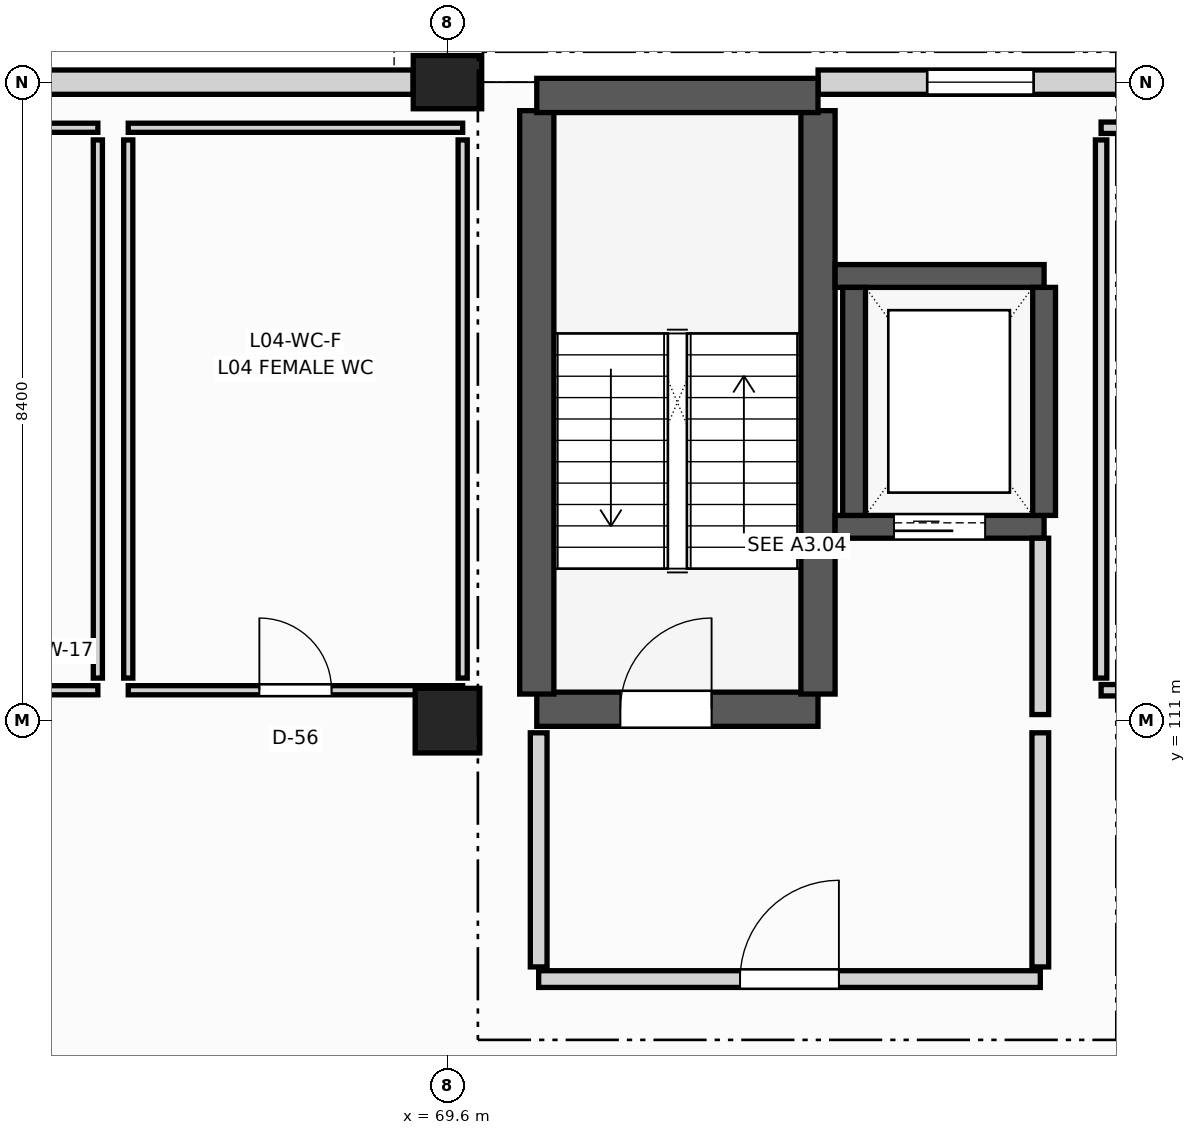
"""IFC4 building model, lengths in metres.
Left out: names, types, materials, properties, quantities, classifications, styles, units other than length and angle.
Written with IfcOpenShell. Run it as: python <this file> out.ifc"""

import sys

from ifc_helpers import new_model, si_unit, direction, frame, frame_2d, origin, origin_2d, place, context, subcontext, project, spatial, rectangle, extrude, element, fill, save


model = new_model("IFC4")
c1 = context("Model", 3, precision=1e-05, world=origin(), true_north=direction((0.0, 1.0)))
c2 = subcontext(c1, "Body", "Model", "MODEL_VIEW")
j1 = project(units=[si_unit("LENGTHUNIT", "METRE"), si_unit("PLANEANGLEUNIT", "RADIAN")], contexts=[c1])
p1 = place(None, origin())
s1 = spatial("IfcSite", under=j1, at=p1, CompositionType="ELEMENT")
p2 = place(p1, origin())
s2 = spatial("IfcBuilding", under=s1, at=p2, CompositionType="ELEMENT")
p3 = place(p2, frame((0.0, 0.0, 18.3)))
s3 = spatial("IfcBuildingStorey", under=s2, at=p3, CompositionType="ELEMENT", Elevation=18.3)
p4 = place(p3, frame((69.6, 111.0, 0.0), z_axis=(0.0, 0.0, 1.0), x_axis=(1.0, 0.0, 0.0)))
e1 = element("IfcColumn", 1, at=p4, inside=s3, PredefinedType="COLUMN", context=c2, shape_type="SweptSolid", body=[
    extrude(rectangle(XDim=0.85, YDim=0.85, at=origin_2d()), origin(), (0.0, 0.0, 1.0), 3.9),
])
p5 = place(p3, frame((69.6, 119.4, 0.0), z_axis=(0.0, 0.0, 1.0), x_axis=(1.0, 0.0, 0.0)))
e2 = element("IfcColumn", 2, at=p5, inside=s3, PredefinedType="COLUMN", context=c2, shape_type="SweptSolid", body=[
    extrude(rectangle(XDim=0.9, YDim=0.7, at=origin_2d()), origin(), (0.0, 0.0, 1.0), 3.9),
])
p6 = place(p3, frame((60.452, 119.4, 0.0), z_axis=(0.0, 0.0, 1.0), x_axis=(1.0, 0.0, 0.0)))
e3 = element("IfcWall", 3, at=p6, inside=s3, PredefinedType="SOLIDWALL", context=c2, shape_type="SweptSolid", body=[
    extrude(rectangle(XDim=8.696, YDim=0.32, at=frame_2d((4.348, 0.0))), origin(), (0.0, 0.0, 1.0), 3.08),
])
p7 = place(p6, frame((0.848, 0.0, 1.45)))
e4 = element("IfcOpeningElement", 4, at=p7, cuts=e3, PredefinedType="OPENING", context=c2, shape_type="SweptSolid", body=[
    extrude(rectangle(XDim=3.0, YDim=1.35, at=frame_2d((1.5, 0.675))), frame((0.0, 0.17, 0.0), z_axis=(0.0, -1.0, 0.0), x_axis=(1.0, 0.0, 0.0)), (0.0, 0.0, 1.0), 0.34),
])
p8 = place(p3, frame((74.476, 119.4, 0.0), z_axis=(0.0, 0.0, 1.0), x_axis=(1.0, 0.0, 0.0)))
e5 = element("IfcWall", 5, at=p8, inside=s3, PredefinedType="SOLIDWALL", context=c2, shape_type="SweptSolid", body=[
    extrude(rectangle(XDim=4.272, YDim=0.32, at=frame_2d((2.136, 0.0))), origin(), (0.0, 0.0, 1.0), 3.08),
])
p9 = place(p8, frame((1.436, 0.0, 0.9)))
e6 = element("IfcOpeningElement", 6, at=p9, cuts=e5, PredefinedType="OPENING", context=c2, shape_type="SweptSolid", body=[
    extrude(rectangle(XDim=1.4, YDim=1.65, at=frame_2d((0.7, 0.825))), frame((0.0, 0.17, 0.0), z_axis=(0.0, -1.0, 0.0), x_axis=(1.0, 0.0, 0.0)), (0.0, 0.0, 1.0), 0.34),
])
p10 = place(p3, frame((70.775, 111.15, 0.0), z_axis=(0.0, 0.0, 1.0), x_axis=(1.0, 0.0, 0.0)))
e7 = element("IfcWall", 7, at=p10, inside=s3, PredefinedType="SHEAR", context=c2, shape_type="SweptSolid", body=[
    extrude(rectangle(XDim=3.7, YDim=0.45, at=frame_2d((1.85, 0.0))), origin(), (0.0, 0.0, 1.0), 3.9),
])
p11 = place(p10, frame((1.1, 0.0, 0.0)))
e8 = element("IfcOpeningElement", 8, at=p11, cuts=e7, PredefinedType="OPENING", context=c2, shape_type="SweptSolid", body=[
    extrude(rectangle(XDim=1.2, YDim=2.2, at=frame_2d((0.6, 1.1))), frame((0.0, 0.235, 0.0), z_axis=(0.0, -1.0, 0.0), x_axis=(1.0, 0.0, 0.0)), (0.0, 0.0, 1.0), 0.47),
])
for number, where, z_axis, x_axis in (
    (9, (70.775, 111.35, 0.0), (0.0, 0.0, 1.0), (0.0, 1.0, 0.0)),
    (10, (74.475, 111.35, 0.0), (0.0, 0.0, 1.0), (0.0, 1.0, 0.0)),
):
    element("IfcWall", number, at=place(p3, frame(where, z_axis=z_axis, x_axis=x_axis)), inside=s3, PredefinedType="SHEAR", context=c2, shape_type="SweptSolid", body=[
        extrude(rectangle(XDim=7.675, YDim=0.45, at=frame_2d((3.837, 0.0))), origin(), (0.0, 0.0, 1.0), 3.9),
    ])
p12 = place(p3, frame((70.775, 119.225, 0.0), z_axis=(0.0, 0.0, 1.0), x_axis=(1.0, 0.0, 0.0)))
e11 = element("IfcWall", 11, at=p12, inside=s3, PredefinedType="SHEAR", context=c2, shape_type="SweptSolid", body=[
    extrude(rectangle(XDim=3.7, YDim=0.45, at=frame_2d((1.85, 0.0))), origin(), (0.0, 0.0, 1.0), 3.9),
])
p13 = place(p3, frame((74.7, 113.55, 0.0), z_axis=(0.0, 0.0, 1.0), x_axis=(1.0, 0.0, 0.0)))
e12 = element("IfcWall", 12, at=p13, inside=s3, PredefinedType="SHEAR", context=c2, shape_type="SweptSolid", body=[
    extrude(rectangle(XDim=2.75, YDim=0.3, at=frame_2d((1.375, 0.0))), origin(), (0.0, 0.0, 1.0), 3.9),
])
p14 = place(p13, frame((0.775, 0.0, 0.0)))
e13 = element("IfcOpeningElement", 13, at=p14, cuts=e12, PredefinedType="OPENING", context=c2, shape_type="SweptSolid", body=[
    extrude(rectangle(XDim=1.2, YDim=2.2, at=frame_2d((0.6, 1.1))), frame((0.0, 0.16, 0.0), z_axis=(0.0, -1.0, 0.0), x_axis=(1.0, 0.0, 0.0)), (0.0, 0.0, 1.0), 0.32),
])
p15 = place(p3, frame((74.7, 116.85, 0.0), z_axis=(0.0, 0.0, 1.0), x_axis=(1.0, 0.0, 0.0)))
e14 = element("IfcWall", 14, at=p15, inside=s3, PredefinedType="SHEAR", context=c2, shape_type="SweptSolid", body=[
    extrude(rectangle(XDim=2.75, YDim=0.3, at=frame_2d((1.375, 0.0))), origin(), (0.0, 0.0, 1.0), 3.9),
])
for number, where, z_axis, x_axis in (
    (15, (74.95, 113.7, 0.0), (0.0, 0.0, 1.0), (0.0, 1.0, 0.0)),
    (16, (77.45, 113.7, 0.0), (0.0, 0.0, 1.0), (0.0, 1.0, 0.0)),
):
    element("IfcWall", number, at=place(p3, frame(where, z_axis=z_axis, x_axis=x_axis)), inside=s3, PredefinedType="SHEAR", context=c2, shape_type="SweptSolid", body=[
        extrude(rectangle(XDim=3.0, YDim=0.3, at=frame_2d((1.5, 0.0))), origin(), (0.0, 0.0, 1.0), 3.9),
    ])
p16 = place(p3, frame((70.8, 107.6, 0.0), z_axis=(0.0, 0.0, 1.0), x_axis=(1.0, 0.0, 0.0)))
e17 = element("IfcWall", 17, at=p16, inside=s3, PredefinedType="PARTITIONING", context=c2, shape_type="SweptSolid", body=[
    extrude(rectangle(XDim=6.6, YDim=0.22, at=frame_2d((3.3, 0.0))), origin(), (0.0, 0.0, 1.0), 3.15),
])
p17 = place(p16, frame((2.65, 0.0, 0.0)))
e18 = element("IfcOpeningElement", 18, at=p17, cuts=e17, PredefinedType="OPENING", context=c2, shape_type="SweptSolid", body=[
    extrude(rectangle(XDim=1.3, YDim=2.2, at=frame_2d((0.65, 1.1))), frame((0.0, 0.12, 0.0), z_axis=(0.0, -1.0, 0.0), x_axis=(1.0, 0.0, 0.0)), (0.0, 0.0, 1.0), 0.24),
])
p18 = place(p3, frame((77.4, 111.08, 0.0), z_axis=(0.0, 0.0, 1.0), x_axis=(0.0, 1.0, 0.0)))
e19 = element("IfcWall", 19, at=p18, inside=s3, PredefinedType="PARTITIONING", context=c2, shape_type="SweptSolid", body=[
    extrude(rectangle(XDim=2.32, YDim=0.22, at=frame_2d((1.16, 0.0))), origin(), (0.0, 0.0, 1.0), 3.15),
])
for number, where, z_axis, x_axis in (
    (20, (70.8, 107.76, 0.0), (0.0, 0.0, 1.0), (0.0, 1.0, 0.0)),
    (21, (77.4, 107.76, 0.0), (0.0, 0.0, 1.0), (0.0, 1.0, 0.0)),
):
    element("IfcWall", number, at=place(p3, frame(where, z_axis=z_axis, x_axis=x_axis)), inside=s3, PredefinedType="PARTITIONING", context=c2, shape_type="SweptSolid", body=[
        extrude(rectangle(XDim=3.08, YDim=0.22, at=frame_2d((1.54, 0.0))), origin(), (0.0, 0.0, 1.0), 3.15),
    ])
p19 = place(p3, frame((78.2, 111.4, 0.0), z_axis=(0.0, 0.0, 1.0), x_axis=(1.0, 0.0, 0.0)))
e22 = element("IfcWall", 22, at=p19, inside=s3, PredefinedType="PARTITIONING", context=c2, shape_type="SweptSolid", body=[
    extrude(rectangle(XDim=21.4, YDim=0.15, at=frame_2d((10.7, 0.0))), origin(), (0.0, 0.0, 1.0), 3.15),
])
p20 = place(p19, frame((6.94, 0.0, 0.0)))
e23 = element("IfcOpeningElement", 23, at=p20, cuts=e22, PredefinedType="OPENING", context=c2, shape_type="SweptSolid", body=[
    extrude(rectangle(XDim=1.1, YDim=2.2, at=frame_2d((0.55, 1.1))), frame((0.0, 0.085, 0.0), z_axis=(0.0, -1.0, 0.0), x_axis=(1.0, 0.0, 0.0)), (0.0, 0.0, 1.0), 0.17),
])
p21 = place(p3, frame((78.2, 118.8, 0.0), z_axis=(0.0, 0.0, 1.0), x_axis=(1.0, 0.0, 0.0)))
e24 = element("IfcWall", 24, at=p21, inside=s3, PredefinedType="PARTITIONING", context=c2, shape_type="SweptSolid", body=[
    extrude(rectangle(XDim=21.4, YDim=0.15, at=frame_2d((10.7, 0.0))), origin(), (0.0, 0.0, 1.0), 3.15),
])
p22 = place(p3, frame((78.2, 111.56, 0.0), z_axis=(0.0, 0.0, 1.0), x_axis=(0.0, 1.0, 0.0)))
e25 = element("IfcWall", 25, at=p22, inside=s3, PredefinedType="PARTITIONING", context=c2, shape_type="SweptSolid", body=[
    extrude(rectangle(XDim=7.08, YDim=0.15, at=frame_2d((3.54, 0.0))), origin(), (0.0, 0.0, 1.0), 3.15),
])
p23 = place(p3, frame((60.8, 111.4, 0.0), z_axis=(0.0, 0.0, 1.0), x_axis=(1.0, 0.0, 0.0)))
e26 = element("IfcWall", 26, at=p23, inside=s3, PredefinedType="PARTITIONING", context=c2, shape_type="SweptSolid", body=[
    extrude(rectangle(XDim=4.2, YDim=0.12, at=frame_2d((2.1, 0.0))), origin(), (0.0, 0.0, 1.0), 3.15),
])
p24 = place(p23, frame((1.625, 0.0, 0.0)))
e27 = element("IfcOpeningElement", 27, at=p24, cuts=e26, PredefinedType="OPENING", context=c2, shape_type="SweptSolid", body=[
    extrude(rectangle(XDim=0.95, YDim=2.1, at=frame_2d((0.475, 1.05))), frame((0.0, 0.07, 0.0), z_axis=(0.0, -1.0, 0.0), x_axis=(1.0, 0.0, 0.0)), (0.0, 0.0, 1.0), 0.14),
])
p25 = place(p3, frame((60.8, 118.8, 0.0), z_axis=(0.0, 0.0, 1.0), x_axis=(1.0, 0.0, 0.0)))
e28 = element("IfcWall", 28, at=p25, inside=s3, PredefinedType="PARTITIONING", context=c2, shape_type="SweptSolid", body=[
    extrude(rectangle(XDim=4.2, YDim=0.12, at=frame_2d((2.1, 0.0))), origin(), (0.0, 0.0, 1.0), 3.15),
])
p26 = place(p3, frame((65.0, 111.56, 0.0), z_axis=(0.0, 0.0, 1.0), x_axis=(0.0, 1.0, 0.0)))
e29 = element("IfcWall", 29, at=p26, inside=s3, PredefinedType="PARTITIONING", context=c2, shape_type="SweptSolid", body=[
    extrude(rectangle(XDim=7.08, YDim=0.12, at=frame_2d((3.54, 0.0))), origin(), (0.0, 0.0, 1.0), 3.15),
])
p27 = place(p3, frame((65.4, 111.4, 0.0), z_axis=(0.0, 0.0, 1.0), x_axis=(1.0, 0.0, 0.0)))
e30 = element("IfcWall", 30, at=p27, inside=s3, PredefinedType="PARTITIONING", context=c2, shape_type="SweptSolid", body=[
    extrude(rectangle(XDim=4.4, YDim=0.12, at=frame_2d((2.2, 0.0))), origin(), (0.0, 0.0, 1.0), 3.15),
])
p28 = place(p27, frame((1.725, 0.0, 0.0)))
e31 = element("IfcOpeningElement", 31, at=p28, cuts=e30, PredefinedType="OPENING", context=c2, shape_type="SweptSolid", body=[
    extrude(rectangle(XDim=0.95, YDim=2.1, at=frame_2d((0.475, 1.05))), frame((0.0, 0.07, 0.0), z_axis=(0.0, -1.0, 0.0), x_axis=(1.0, 0.0, 0.0)), (0.0, 0.0, 1.0), 0.14),
])
p29 = place(p3, frame((65.4, 118.8, 0.0), z_axis=(0.0, 0.0, 1.0), x_axis=(1.0, 0.0, 0.0)))
e32 = element("IfcWall", 32, at=p29, inside=s3, PredefinedType="PARTITIONING", context=c2, shape_type="SweptSolid", body=[
    extrude(rectangle(XDim=4.4, YDim=0.12, at=frame_2d((2.2, 0.0))), origin(), (0.0, 0.0, 1.0), 3.15),
])
for number, where, z_axis, x_axis in (
    (33, (65.4, 111.56, 0.0), (0.0, 0.0, 1.0), (0.0, 1.0, 0.0)),
    (34, (69.8, 111.56, 0.0), (0.0, 0.0, 1.0), (0.0, 1.0, 0.0)),
):
    element("IfcWall", number, at=place(p3, frame(where, z_axis=z_axis, x_axis=x_axis)), inside=s3, PredefinedType="PARTITIONING", context=c2, shape_type="SweptSolid", body=[
        extrude(rectangle(XDim=7.08, YDim=0.12, at=frame_2d((3.54, 0.0))), origin(), (0.0, 0.0, 1.0), 3.15),
    ])
p30 = place(p9, origin())
e35 = element("IfcWindow", 35, at=p30, inside=s3, PartitioningType="SINGLE_PANEL", PredefinedType="WINDOW", context=c2, shape_type="SweptSolid", body=[
    extrude(rectangle(XDim=1.4, YDim=1.65, at=frame_2d((0.7, 0.825))), frame((0.0, 0.03, 0.0), z_axis=(0.0, -1.0, 0.0), x_axis=(1.0, 0.0, 0.0)), (0.0, 0.0, 1.0), 0.06),
])
fill(e6, e35)
p31 = place(p11, origin())
e36 = element("IfcDoor", 36, at=p31, inside=s3, OperationType="SINGLE_SWING_RIGHT", PredefinedType="DOOR", context=c2, shape_type="SweptSolid", body=[
    extrude(rectangle(XDim=1.2, YDim=2.2, at=frame_2d((0.6, 1.1))), frame((0.0, 0.025, 0.0), z_axis=(0.0, -1.0, 0.0), x_axis=(1.0, 0.0, 0.0)), (0.0, 0.0, 1.0), 0.05),
])
fill(e8, e36)
p32 = place(p14, origin())
e37 = element("IfcDoor", 37, at=p32, inside=s3, OperationType="SLIDING_TO_LEFT", PredefinedType="DOOR", context=c2, shape_type="SweptSolid", body=[
    extrude(rectangle(XDim=1.2, YDim=2.2, at=frame_2d((0.6, 1.1))), frame((0.0, 0.025, 0.0), z_axis=(0.0, -1.0, 0.0), x_axis=(1.0, 0.0, 0.0)), (0.0, 0.0, 1.0), 0.05),
])
fill(e13, e37)
p33 = place(p17, origin())
e38 = element("IfcDoor", 38, at=p33, inside=s3, OperationType="SINGLE_SWING_RIGHT", PredefinedType="DOOR", context=c2, shape_type="SweptSolid", body=[
    extrude(rectangle(XDim=1.3, YDim=2.2, at=frame_2d((0.65, 1.1))), frame((0.0, 0.025, 0.0), z_axis=(0.0, -1.0, 0.0), x_axis=(1.0, 0.0, 0.0)), (0.0, 0.0, 1.0), 0.05),
])
fill(e18, e38)
p34 = place(p28, origin())
e39 = element("IfcDoor", 39, at=p34, inside=s3, OperationType="SINGLE_SWING_LEFT", PredefinedType="DOOR", context=c2, shape_type="SweptSolid", body=[
    extrude(rectangle(XDim=0.95, YDim=2.1, at=frame_2d((0.475, 1.05))), frame((0.0, 0.025, 0.0), z_axis=(0.0, -1.0, 0.0), x_axis=(1.0, 0.0, 0.0)), (0.0, 0.0, 1.0), 0.05),
])
fill(e31, e39)
save(model, sys.argv[1])
